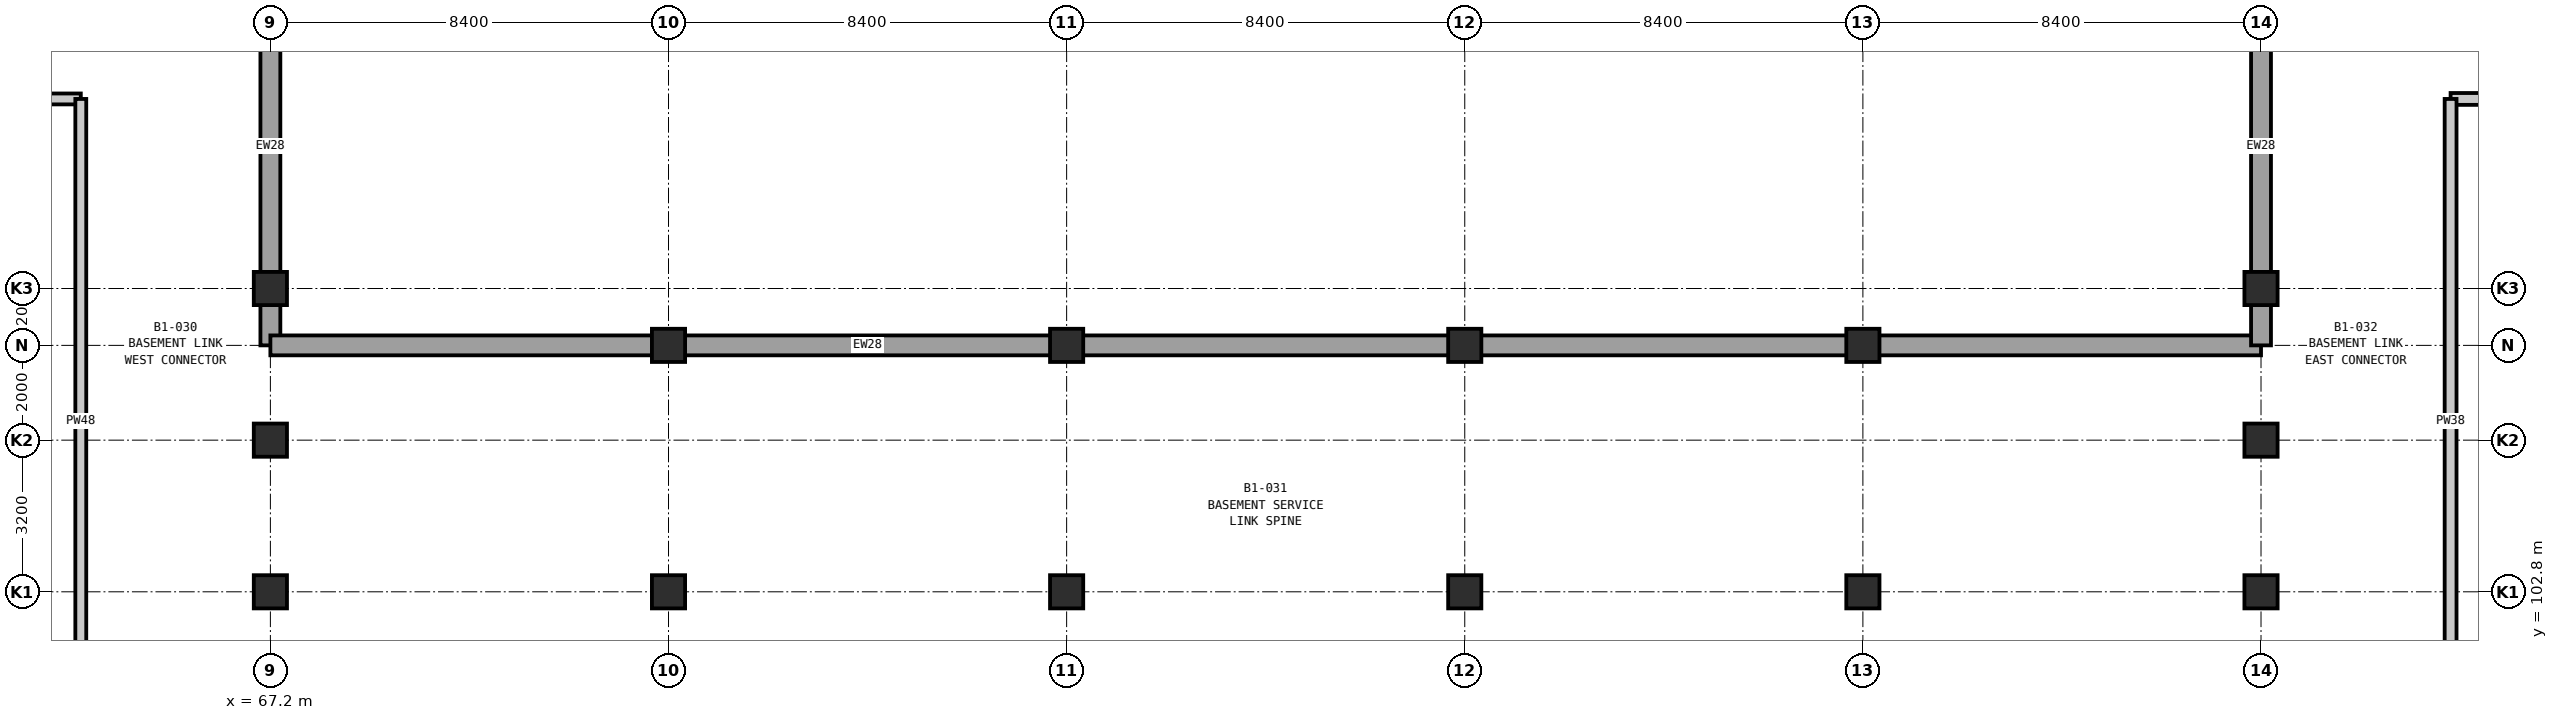
"""IFC4 building model, lengths in metres.
Left out: names, types, materials, properties, quantities, classifications, styles, units other than length and angle.
Written with IfcOpenShell. Run it as: python <this file> out.ifc"""

import sys

from ifc_helpers import new_model, si_unit, direction, frame, frame_2d, origin, origin_2d, place, context, subcontext, project, spatial, rectangle, extrude, element, save


model = new_model("IFC4")
c1 = context("Model", 3, precision=1e-05, world=origin(), true_north=direction((0.0, 1.0)))
c2 = subcontext(c1, "Body", "Model", "MODEL_VIEW")
j1 = project(units=[si_unit("LENGTHUNIT", "METRE"), si_unit("PLANEANGLEUNIT", "RADIAN")], contexts=[c1])
p1 = place(None, origin())
s1 = spatial("IfcSite", under=j1, at=p1, CompositionType="ELEMENT")
p2 = place(p1, origin())
s2 = spatial("IfcBuilding", under=s1, at=p2, CompositionType="ELEMENT")
p3 = place(p2, frame((0.0, 0.0, -4.8)))
s3 = spatial("IfcBuildingStorey", under=s2, at=p3, CompositionType="ELEMENT", Elevation=-4.8)
for number, where, z_axis, x_axis in (
    (1, (67.2, 102.8, 0.0), (0.0, 0.0, 1.0), (1.0, 0.0, 0.0)),
    (2, (67.2, 106.0, 0.0), (0.0, 0.0, 1.0), (1.0, 0.0, 0.0)),
    (3, (67.2, 109.2, 0.0), (0.0, 0.0, 1.0), (1.0, 0.0, 0.0)),
    (4, (75.6, 102.8, 0.0), (0.0, 0.0, 1.0), (1.0, 0.0, 0.0)),
    (5, (75.6, 108.0, 0.0), (0.0, 0.0, 1.0), (1.0, 0.0, 0.0)),
    (6, (84.0, 102.8, 0.0), (0.0, 0.0, 1.0), (1.0, 0.0, 0.0)),
    (7, (84.0, 108.0, 0.0), (0.0, 0.0, 1.0), (1.0, 0.0, 0.0)),
    (8, (92.4, 102.8, 0.0), (0.0, 0.0, 1.0), (1.0, 0.0, 0.0)),
    (9, (92.4, 108.0, 0.0), (0.0, 0.0, 1.0), (1.0, 0.0, 0.0)),
    (10, (100.8, 102.8, 0.0), (0.0, 0.0, 1.0), (1.0, 0.0, 0.0)),
    (11, (100.8, 108.0, 0.0), (0.0, 0.0, 1.0), (1.0, 0.0, 0.0)),
    (12, (109.2, 102.8, 0.0), (0.0, 0.0, 1.0), (1.0, 0.0, 0.0)),
    (13, (109.2, 106.0, 0.0), (0.0, 0.0, 1.0), (1.0, 0.0, 0.0)),
    (14, (109.2, 109.2, 0.0), (0.0, 0.0, 1.0), (1.0, 0.0, 0.0)),
):
    element("IfcColumn", number, at=place(p3, frame(where, z_axis=z_axis, x_axis=x_axis)), inside=s3, PredefinedType="COLUMN", context=c2, shape_type="SweptSolid", body=[
        extrude(rectangle(XDim=0.7, YDim=0.7, at=origin_2d()), origin(), (0.0, 0.0, 1.0), 4.8),
    ])
p4 = place(p3, frame((67.2, 116.4, 0.0), z_axis=(0.0, 0.0, 1.0), x_axis=(0.0, -1.0, 0.0)))
e15 = element("IfcWall", 15, at=p4, inside=s3, PredefinedType="SOLIDWALL", context=c2, shape_type="SweptSolid", body=[
    extrude(rectangle(XDim=8.4, YDim=0.42, at=frame_2d((4.2, 0.0))), origin(), (0.0, 0.0, 1.0), 4.05),
])
p5 = place(p3, frame((67.2, 108.0, 0.0), z_axis=(0.0, 0.0, 1.0), x_axis=(1.0, 0.0, 0.0)))
e16 = element("IfcWall", 16, at=p5, inside=s3, PredefinedType="SOLIDWALL", context=c2, shape_type="SweptSolid", body=[
    extrude(rectangle(XDim=8.4, YDim=0.42, at=frame_2d((4.2, 0.0))), origin(), (0.0, 0.0, 1.0), 4.05),
])
for number, where, z_axis, x_axis in (
    (17, (75.6, 108.0, 0.0), (0.0, 0.0, 1.0), (1.0, 0.0, 0.0)),
    (18, (84.0, 108.0, 0.0), (0.0, 0.0, 1.0), (1.0, 0.0, 0.0)),
):
    element("IfcWall", number, at=place(p3, frame(where, z_axis=z_axis, x_axis=x_axis)), inside=s3, PredefinedType="SOLIDWALL", context=c2, shape_type="SweptSolid", body=[
        extrude(rectangle(XDim=8.4, YDim=0.42, at=frame_2d((4.2, 0.0))), origin(), (0.0, 0.0, 1.0), 4.05),
    ])
p6 = place(p3, frame((92.4, 108.0, 0.0), z_axis=(0.0, 0.0, 1.0), x_axis=(1.0, 0.0, 0.0)))
e19 = element("IfcWall", 19, at=p6, inside=s3, PredefinedType="SOLIDWALL", context=c2, shape_type="SweptSolid", body=[
    extrude(rectangle(XDim=8.4, YDim=0.42, at=frame_2d((4.2, 0.0))), origin(), (0.0, 0.0, 1.0), 4.05),
])
for number, where, z_axis, x_axis in (
    (20, (100.8, 108.0, 0.0), (0.0, 0.0, 1.0), (1.0, 0.0, 0.0)),
    (21, (109.2, 108.0, 0.0), (0.0, 0.0, 1.0), (0.0, 1.0, 0.0)),
):
    element("IfcWall", number, at=place(p3, frame(where, z_axis=z_axis, x_axis=x_axis)), inside=s3, PredefinedType="SOLIDWALL", context=c2, shape_type="SweptSolid", body=[
        extrude(rectangle(XDim=8.4, YDim=0.42, at=frame_2d((4.2, 0.0))), origin(), (0.0, 0.0, 1.0), 4.05),
    ])
p7 = place(p3, frame((29.6, 113.2, 0.0), z_axis=(0.0, 0.0, 1.0), x_axis=(1.0, 0.0, 0.0)))
e22 = element("IfcWall", 22, at=p7, inside=s3, PredefinedType="PARTITIONING", context=c2, shape_type="SweptSolid", body=[
    extrude(rectangle(XDim=33.6, YDim=0.23, at=frame_2d((16.8, 0.0))), origin(), (0.0, 0.0, 1.0), 4.44),
])
p8 = place(p7, frame((16.075, 0.0, 0.0)))
e23 = element("IfcOpeningElement", 23, at=p8, cuts=e22, PredefinedType="OPENING", context=c2, shape_type="SweptSolid", body=[
    extrude(rectangle(XDim=1.45, YDim=2.25, at=frame_2d((0.725, 1.125))), frame((0.0, 0.125, 0.0), z_axis=(0.0, -1.0, 0.0), x_axis=(1.0, 0.0, 0.0)), (0.0, 0.0, 1.0), 0.25),
])
p9 = place(p3, frame((113.2, 113.2, 0.0), z_axis=(0.0, 0.0, 1.0), x_axis=(1.0, 0.0, 0.0)))
e24 = element("IfcWall", 24, at=p9, inside=s3, PredefinedType="PARTITIONING", context=c2, shape_type="SweptSolid", body=[
    extrude(rectangle(XDim=37.6, YDim=0.25, at=frame_2d((18.8, 0.0))), origin(), (0.0, 0.0, 1.0), 4.44),
])
p10 = place(p9, frame((18.025, 0.0, 0.0)))
e25 = element("IfcOpeningElement", 25, at=p10, cuts=e24, PredefinedType="OPENING", context=c2, shape_type="SweptSolid", body=[
    extrude(rectangle(XDim=1.55, YDim=2.25, at=frame_2d((0.775, 1.125))), frame((0.0, 0.135, 0.0), z_axis=(0.0, -1.0, 0.0), x_axis=(1.0, 0.0, 0.0)), (0.0, 0.0, 1.0), 0.27),
])
p11 = place(p3, frame((63.2, 99.6, 0.0), z_axis=(0.0, 0.0, 1.0), x_axis=(0.0, 1.0, 0.0)))
e26 = element("IfcWall", 26, at=p11, inside=s3, PredefinedType="PARTITIONING", context=c2, shape_type="SweptSolid", body=[
    extrude(rectangle(XDim=13.6, YDim=0.23, at=frame_2d((6.8, 0.0))), origin(), (0.0, 0.0, 1.0), 4.44),
])
p12 = place(p3, frame((113.2, 99.6, 0.0), z_axis=(0.0, 0.0, 1.0), x_axis=(0.0, 1.0, 0.0)))
e27 = element("IfcWall", 27, at=p12, inside=s3, PredefinedType="PARTITIONING", context=c2, shape_type="SweptSolid", body=[
    extrude(rectangle(XDim=13.6, YDim=0.25, at=frame_2d((6.8, 0.0))), origin(), (0.0, 0.0, 1.0), 4.44),
])
save(model, sys.argv[1])
